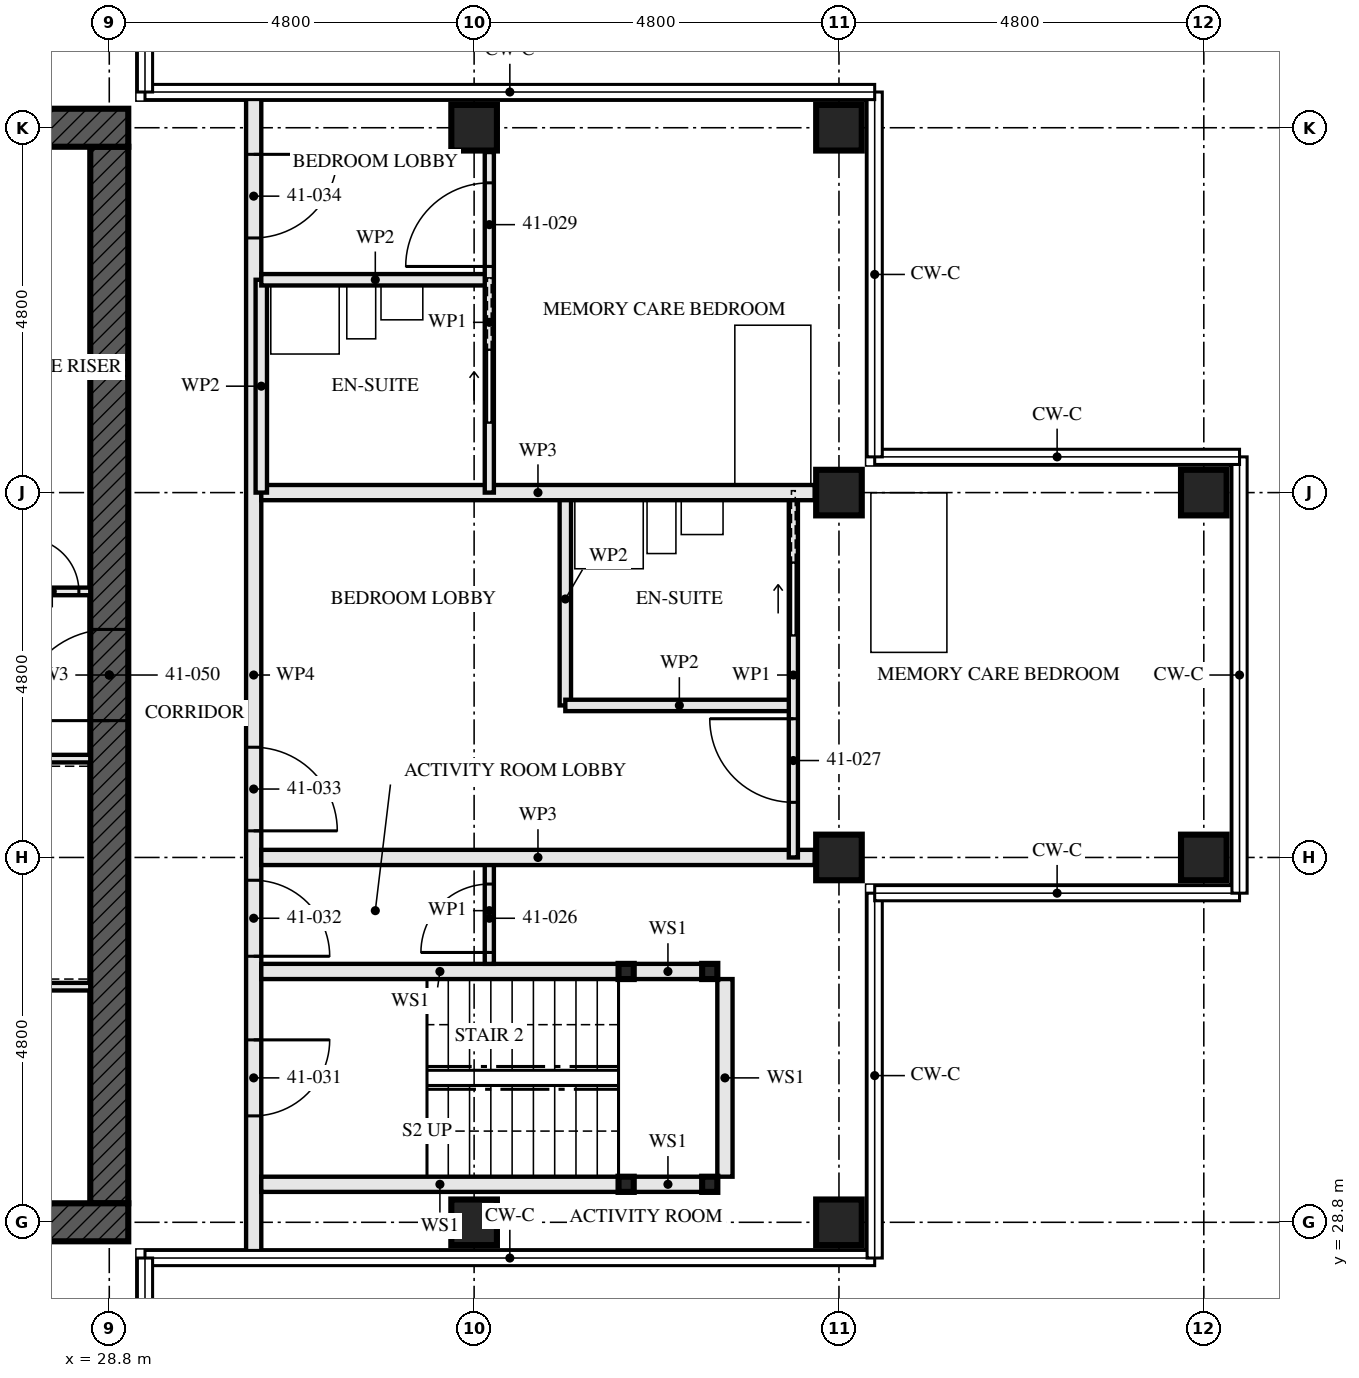
"""IFC4 building model, lengths in metres.
Left out: names, types, materials, properties, quantities, classifications, styles, units other than length and angle.
Written with IfcOpenShell. Run it as: python <this file> out.ifc"""

import sys

from ifc_helpers import new_model, si_unit, direction, frame, frame_2d, origin, origin_2d, place, context, subcontext, project, spatial, rectangle, hollow_rectangle, extrude, element, fill, save


model = new_model("IFC4")
c1 = context("Model", 3, precision=1e-05, world=origin(), true_north=direction((0.0, 1.0)))
c2 = subcontext(c1, "Body", "Model", "MODEL_VIEW")
j1 = project(units=[si_unit("LENGTHUNIT", "METRE"), si_unit("PLANEANGLEUNIT", "RADIAN")], contexts=[c1])
p1 = place(None, origin())
s1 = spatial("IfcSite", under=j1, at=p1, CompositionType="ELEMENT")
p2 = place(p1, origin())
s2 = spatial("IfcBuilding", under=s1, at=p2, CompositionType="ELEMENT")
p3 = place(p2, frame((0.0, 0.0, 151.5)))
s3 = spatial("IfcBuildingStorey", under=s2, at=p3, CompositionType="ELEMENT", Elevation=151.5)
for number, where, z_axis, x_axis in (
    (1, (33.6, 28.8, 0.0), (0.0, 0.0, 1.0), (0.0, 1.0, 0.0)),
    (2, (33.6, 43.2, 0.0), (0.0, 0.0, 1.0), (0.0, 1.0, 0.0)),
):
    element("IfcColumn", number, at=place(p3, frame(where, z_axis=z_axis, x_axis=x_axis)), inside=s3, PredefinedType="COLUMN", context=c2, shape_type="SweptSolid", body=[
        extrude(hollow_rectangle(XDim=0.6, YDim=0.6, WallThickness=0.08, at=origin_2d()), origin(), (0.0, 0.0, 1.0), 3.5),
    ])
for number, where, z_axis, x_axis in (
    (3, (38.4, 28.8, 0.0), (0.0, 0.0, 1.0), (0.0, 1.0, 0.0)),
    (4, (38.4, 33.6, 0.0), (0.0, 0.0, 1.0), (0.0, 1.0, 0.0)),
    (5, (38.4, 38.4, 0.0), (0.0, 0.0, 1.0), (0.0, 1.0, 0.0)),
    (6, (38.4, 43.2, 0.0), (0.0, 0.0, 1.0), (0.0, 1.0, 0.0)),
    (7, (43.2, 33.6, 0.0), (0.0, 0.0, 1.0), (0.0, 1.0, 0.0)),
    (8, (43.2, 38.4, 0.0), (0.0, 0.0, 1.0), (0.0, 1.0, 0.0)),
):
    element("IfcColumn", number, at=place(p3, frame(where, z_axis=z_axis, x_axis=x_axis)), inside=s3, PredefinedType="COLUMN", context=c2, shape_type="SweptSolid", body=[
        extrude(hollow_rectangle(XDim=0.6, YDim=0.6, WallThickness=0.06, at=origin_2d()), origin(), (0.0, 0.0, 1.0), 3.5),
    ])
p4 = place(p3, frame((14.15, 28.8, -0.17), z_axis=(0.0, 0.0, 1.0), x_axis=(1.0, 0.0, 0.0)))
e9 = element("IfcWall", 9, at=p4, inside=s3, PredefinedType="SHEAR", context=c2, shape_type="SweptSolid", body=[
    extrude(rectangle(XDim=14.9, YDim=0.5, at=frame_2d((7.45, 0.0))), origin(), (0.0, 0.0, 1.0), 3.5),
])
p5 = place(p4, frame((6.85, 0.0, 0.17)))
e10 = element("IfcOpeningElement", 10, at=p5, cuts=e9, PredefinedType="OPENING", context=c2, shape_type="SweptSolid", body=[
    extrude(rectangle(XDim=1.2, YDim=2.1, at=frame_2d((0.6, 1.05))), frame((0.0, 0.26, 0.0), z_axis=(0.0, -1.0, 0.0), x_axis=(1.0, 0.0, 0.0)), (0.0, 0.0, 1.0), 0.521),
])
p6 = place(p3, frame((29.05, 43.2, -0.17), z_axis=(0.0, 0.0, 1.0), x_axis=(-1.0, 0.0, 0.0)))
e11 = element("IfcWall", 11, at=p6, inside=s3, PredefinedType="SHEAR", context=c2, shape_type="SweptSolid", body=[
    extrude(rectangle(XDim=14.9, YDim=0.5, at=frame_2d((7.45, 0.0))), origin(), (0.0, 0.0, 1.0), 3.5),
])
p7 = place(p6, frame((6.85, 0.0, 0.17)))
e12 = element("IfcOpeningElement", 12, at=p7, cuts=e11, PredefinedType="OPENING", context=c2, shape_type="SweptSolid", body=[
    extrude(rectangle(XDim=1.2, YDim=2.1, at=frame_2d((0.6, 1.05))), frame((0.0, 0.26, 0.0), z_axis=(0.0, -1.0, 0.0), x_axis=(1.0, 0.0, 0.0)), (0.0, 0.0, 1.0), 0.521),
])
p8 = place(p3, frame((28.8, 29.05, -0.17), z_axis=(0.0, 0.0, 1.0), x_axis=(0.0, 1.0, 0.0)))
e13 = element("IfcWall", 13, at=p8, inside=s3, PredefinedType="SHEAR", context=c2, shape_type="SweptSolid", body=[
    extrude(rectangle(XDim=13.9, YDim=0.5, at=frame_2d((6.95, 0.0))), origin(), (0.0, 0.0, 1.0), 3.5),
])
p9 = place(p8, frame((6.35, 0.0, 0.17)))
e14 = element("IfcOpeningElement", 14, at=p9, cuts=e13, PredefinedType="OPENING", context=c2, shape_type="SweptSolid", body=[
    extrude(rectangle(XDim=1.2, YDim=2.1, at=frame_2d((0.6, 1.05))), frame((0.0, 0.26, 0.0), z_axis=(0.0, -1.0, 0.0), x_axis=(1.0, 0.0, 0.0)), (0.0, 0.0, 1.0), 0.521),
])
for number, where, z_axis, x_axis in (
    (15, (36.7, 29.3, 0.0), (0.0, 0.0, 1.0), (1.0, 0.0, 0.0)),
    (16, (36.7, 32.1, 0.0), (0.0, 0.0, 1.0), (1.0, 0.0, 0.0)),
    (17, (35.6, 29.3, 0.0), (0.0, 0.0, 1.0), (1.0, 0.0, 0.0)),
    (18, (35.6, 32.1, 0.0), (0.0, 0.0, 1.0), (1.0, 0.0, 0.0)),
):
    element("IfcColumn", number, at=place(p3, frame(where, z_axis=z_axis, x_axis=x_axis)), inside=s3, PredefinedType="COLUMN", context=c2, shape_type="SweptSolid", body=[
        extrude(hollow_rectangle(XDim=0.2, YDim=0.2, WallThickness=0.008, at=origin_2d()), origin(), (0.0, 0.0, 1.0), 3.33),
    ])
p10 = place(p3, frame((36.6, 29.3, 0.0), z_axis=(0.0, 0.0, 1.0), x_axis=(-1.0, 0.0, 0.0)))
e19 = element("IfcWall", 19, at=p10, inside=s3, PredefinedType="SOLIDWALL", context=c2, shape_type="SweptSolid", body=[
    extrude(rectangle(XDim=0.9, YDim=0.2, at=frame_2d((0.45, 0.0))), origin(), (0.0, 0.0, 1.0), 2.99),
])
p11 = place(p3, frame((35.5, 29.3, 0.0), z_axis=(0.0, 0.0, 1.0), x_axis=(-1.0, 0.0, 0.0)))
e20 = element("IfcWall", 20, at=p11, inside=s3, PredefinedType="SOLIDWALL", context=c2, shape_type="SweptSolid", body=[
    extrude(rectangle(XDim=4.7, YDim=0.2, at=frame_2d((2.35, 0.0))), origin(), (0.0, 0.0, 1.0), 2.99),
])
p12 = place(p3, frame((36.6, 32.1, 0.0), z_axis=(0.0, 0.0, 1.0), x_axis=(-1.0, 0.0, 0.0)))
e21 = element("IfcWall", 21, at=p12, inside=s3, PredefinedType="SOLIDWALL", context=c2, shape_type="SweptSolid", body=[
    extrude(rectangle(XDim=0.9, YDim=0.2, at=frame_2d((0.45, 0.0))), origin(), (0.0, 0.0, 1.0), 2.99),
])
p13 = place(p3, frame((35.5, 32.1, 0.0), z_axis=(0.0, 0.0, 1.0), x_axis=(-1.0, 0.0, 0.0)))
e22 = element("IfcWall", 22, at=p13, inside=s3, PredefinedType="SOLIDWALL", context=c2, shape_type="SweptSolid", body=[
    extrude(rectangle(XDim=4.7, YDim=0.2, at=frame_2d((2.35, 0.0))), origin(), (0.0, 0.0, 1.0), 2.99),
])
p14 = place(p3, frame((36.9, 29.4, 0.0), z_axis=(0.0, 0.0, 1.0), x_axis=(0.0, 1.0, 0.0)))
e23 = element("IfcWall", 23, at=p14, inside=s3, PredefinedType="SOLIDWALL", context=c2, shape_type="SweptSolid", body=[
    extrude(rectangle(XDim=2.6, YDim=0.2, at=frame_2d((1.3, 0.0))), origin(), (0.0, 0.0, 1.0), 3.33),
])
p15 = place(p3, frame((33.8, 32.2, 0.0), z_axis=(0.0, 0.0, 1.0), x_axis=(0.0, 1.0, 0.0)))
e24 = element("IfcWall", 24, at=p15, inside=s3, PredefinedType="PARTITIONING", context=c2, shape_type="SweptSolid", body=[
    extrude(rectangle(XDim=1.4, YDim=0.12, at=frame_2d((0.7, 0.0))), origin(), (0.0, 0.0, 1.0), 3.33),
])
p16 = place(p15, frame((0.15, 0.0, 0.0)))
e25 = element("IfcOpeningElement", 25, at=p16, cuts=e24, PredefinedType="OPENING", context=c2, shape_type="SweptSolid", body=[
    extrude(rectangle(XDim=0.9, YDim=2.1, at=frame_2d((0.45, 1.05))), frame((0.0, 0.071, 0.0), z_axis=(0.0, -1.0, 0.0), x_axis=(1.0, 0.0, 0.0)), (0.0, 0.0, 1.0), 0.141),
])
p17 = place(p3, frame((38.08, 33.6, 0.0), z_axis=(0.0, 0.0, 1.0), x_axis=(-1.0, 0.0, 0.0)))
e26 = element("IfcWall", 26, at=p17, inside=s3, PredefinedType="PARTITIONING", context=c2, shape_type="SweptSolid", body=[
    extrude(rectangle(XDim=7.28, YDim=0.2, at=frame_2d((3.64, 0.0))), origin(), (0.0, 0.0, 1.0), 2.55),
])
p18 = place(p3, frame((37.8, 35.6, 0.0), z_axis=(0.0, 0.0, 1.0), x_axis=(-1.0, 0.0, 0.0)))
e27 = element("IfcWall", 27, at=p18, inside=s3, PredefinedType="PARTITIONING", context=c2, shape_type="SweptSolid", body=[
    extrude(rectangle(XDim=3.0, YDim=0.15, at=frame_2d((1.5, 0.0))), origin(), (0.0, 0.0, 1.0), 3.33),
])
p19 = place(p3, frame((34.8, 35.6, 0.0), z_axis=(0.0, 0.0, 1.0), x_axis=(0.0, 1.0, 0.0)))
e28 = element("IfcWall", 28, at=p19, inside=s3, PredefinedType="PARTITIONING", context=c2, shape_type="SweptSolid", body=[
    extrude(rectangle(XDim=2.8, YDim=0.15, at=frame_2d((1.4, 0.0))), origin(), (0.0, 0.0, 1.0), 3.33),
])
p20 = place(p3, frame((37.8, 33.6, 0.0), z_axis=(0.0, 0.0, 1.0), x_axis=(0.0, 1.0, 0.0)))
e29 = element("IfcWall", 29, at=p20, inside=s3, PredefinedType="PARTITIONING", context=c2, shape_type="SweptSolid", body=[
    extrude(rectangle(XDim=4.8, YDim=0.12, at=frame_2d((2.4, 0.0))), origin(), (0.0, 0.0, 1.0), 3.33),
])
p21 = place(p20, frame((0.725, 0.0, 0.0)))
e30 = element("IfcOpeningElement", 30, at=p21, cuts=e29, PredefinedType="OPENING", context=c2, shape_type="SweptSolid", body=[
    extrude(rectangle(XDim=1.1, YDim=2.1, at=frame_2d((0.55, 1.05))), frame((0.0, 0.071, 0.0), z_axis=(0.0, -1.0, 0.0), x_axis=(1.0, 0.0, 0.0)), (0.0, 0.0, 1.0), 0.141),
])
p22 = place(p20, frame((2.925, 0.0, 0.0)))
e31 = element("IfcOpeningElement", 31, at=p22, cuts=e29, PredefinedType="OPENING", context=c2, shape_type="SweptSolid", body=[
    extrude(rectangle(XDim=0.95, YDim=2.1, at=frame_2d((0.475, 1.05))), frame((0.0, 0.071, 0.0), z_axis=(0.0, -1.0, 0.0), x_axis=(1.0, 0.0, 0.0)), (0.0, 0.0, 1.0), 0.141),
])
p23 = place(p3, frame((38.08, 38.4, 0.0), z_axis=(0.0, 0.0, 1.0), x_axis=(-1.0, 0.0, 0.0)))
e32 = element("IfcWall", 32, at=p23, inside=s3, PredefinedType="PARTITIONING", context=c2, shape_type="SweptSolid", body=[
    extrude(rectangle(XDim=7.28, YDim=0.2, at=frame_2d((3.64, 0.0))), origin(), (0.0, 0.0, 1.0), 2.55),
])
p24 = place(p3, frame((33.8, 41.2, 0.0), z_axis=(0.0, 0.0, 1.0), x_axis=(-1.0, 0.0, 0.0)))
e33 = element("IfcWall", 33, at=p24, inside=s3, PredefinedType="PARTITIONING", context=c2, shape_type="SweptSolid", body=[
    extrude(rectangle(XDim=3.0, YDim=0.15, at=frame_2d((1.5, 0.0))), origin(), (0.0, 0.0, 1.0), 3.33),
])
p25 = place(p3, frame((30.8, 38.4, 0.0), z_axis=(0.0, 0.0, 1.0), x_axis=(0.0, 1.0, 0.0)))
e34 = element("IfcWall", 34, at=p25, inside=s3, PredefinedType="PARTITIONING", context=c2, shape_type="SweptSolid", body=[
    extrude(rectangle(XDim=2.8, YDim=0.15, at=frame_2d((1.4, 0.0))), origin(), (0.0, 0.0, 1.0), 3.33),
])
p26 = place(p3, frame((33.8, 38.4, 0.0), z_axis=(0.0, 0.0, 1.0), x_axis=(0.0, 1.0, 0.0)))
e35 = element("IfcWall", 35, at=p26, inside=s3, PredefinedType="PARTITIONING", context=c2, shape_type="SweptSolid", body=[
    extrude(rectangle(XDim=4.48, YDim=0.12, at=frame_2d((2.24, 0.0))), origin(), (0.0, 0.0, 1.0), 3.33),
])
p27 = place(p26, frame((2.975, 0.0, 0.0)))
e36 = element("IfcOpeningElement", 36, at=p27, cuts=e35, PredefinedType="OPENING", context=c2, shape_type="SweptSolid", body=[
    extrude(rectangle(XDim=1.1, YDim=2.1, at=frame_2d((0.55, 1.05))), frame((0.0, 0.071, 0.0), z_axis=(0.0, -1.0, 0.0), x_axis=(1.0, 0.0, 0.0)), (0.0, 0.0, 1.0), 0.141),
])
p28 = place(p26, frame((0.925, 0.0, 0.0)))
e37 = element("IfcOpeningElement", 37, at=p28, cuts=e35, PredefinedType="OPENING", context=c2, shape_type="SweptSolid", body=[
    extrude(rectangle(XDim=0.95, YDim=2.1, at=frame_2d((0.475, 1.05))), frame((0.0, 0.071, 0.0), z_axis=(0.0, -1.0, 0.0), x_axis=(1.0, 0.0, 0.0)), (0.0, 0.0, 1.0), 0.141),
])
p29 = place(p3, frame((30.7, 28.35, 0.0), z_axis=(0.0, 0.0, 1.0), x_axis=(0.0, 1.0, 0.0)))
e38 = element("IfcWall", 38, at=p29, inside=s3, PredefinedType="PARTITIONING", context=c2, shape_type="SweptSolid", body=[
    extrude(rectangle(XDim=15.3, YDim=0.2, at=frame_2d((7.65, 0.0))), origin(), (0.0, 0.0, 1.0), 2.32),
])
p30 = place(p29, frame((1.85, 0.0, 0.0)))
e39 = element("IfcOpeningElement", 39, at=p30, cuts=e38, PredefinedType="OPENING", context=c2, shape_type="SweptSolid", body=[
    extrude(rectangle(XDim=1.0, YDim=2.1, at=frame_2d((0.5, 1.05))), frame((0.0, 0.111, 0.0), z_axis=(0.0, -1.0, 0.0), x_axis=(1.0, 0.0, 0.0)), (0.0, 0.0, 1.0), 0.221),
])
p31 = place(p29, frame((3.95, 0.0, 0.0)))
e40 = element("IfcOpeningElement", 40, at=p31, cuts=e38, PredefinedType="OPENING", context=c2, shape_type="SweptSolid", body=[
    extrude(rectangle(XDim=1.0, YDim=2.1, at=frame_2d((0.5, 1.05))), frame((0.0, 0.111, 0.0), z_axis=(0.0, -1.0, 0.0), x_axis=(1.0, 0.0, 0.0)), (0.0, 0.0, 1.0), 0.221),
])
p32 = place(p29, frame((5.6, 0.0, 0.0)))
e41 = element("IfcOpeningElement", 41, at=p32, cuts=e38, PredefinedType="OPENING", context=c2, shape_type="SweptSolid", body=[
    extrude(rectangle(XDim=1.1, YDim=2.1, at=frame_2d((0.55, 1.05))), frame((0.0, 0.111, 0.0), z_axis=(0.0, -1.0, 0.0), x_axis=(1.0, 0.0, 0.0)), (0.0, 0.0, 1.0), 0.221),
])
p33 = place(p29, frame((13.4, 0.0, 0.0)))
e42 = element("IfcOpeningElement", 42, at=p33, cuts=e38, PredefinedType="OPENING", context=c2, shape_type="SweptSolid", body=[
    extrude(rectangle(XDim=1.1, YDim=2.1, at=frame_2d((0.55, 1.05))), frame((0.0, 0.111, 0.0), z_axis=(0.0, -1.0, 0.0), x_axis=(1.0, 0.0, 0.0)), (0.0, 0.0, 1.0), 0.221),
])
p34 = place(p3, frame((23.05, 34.9, 0.0), z_axis=(0.0, 0.0, 1.0), x_axis=(1.0, 0.0, 0.0)))
e43 = element("IfcWall", 43, at=p34, inside=s3, PredefinedType="SOLIDWALL", context=c2, shape_type="SweptSolid", body=[
    extrude(rectangle(XDim=5.5, YDim=0.1, at=frame_2d((2.75, 0.0))), origin(), (0.0, 0.0, 1.0), 3.33),
])
p35 = place(p34, frame((0.85, 0.0, 0.0)))
e44 = element("IfcOpeningElement", 44, at=p35, cuts=e43, PredefinedType="OPENING", context=c2, shape_type="SweptSolid", body=[
    extrude(rectangle(XDim=1.0, YDim=2.1, at=frame_2d((0.5, 1.05))), frame((0.0, 0.061, 0.0), z_axis=(0.0, -1.0, 0.0), x_axis=(1.0, 0.0, 0.0)), (0.0, 0.0, 1.0), 0.121),
])
p36 = place(p34, frame((3.625, 0.0, 0.0)))
e45 = element("IfcOpeningElement", 45, at=p36, cuts=e43, PredefinedType="OPENING", context=c2, shape_type="SweptSolid", body=[
    extrude(rectangle(XDim=1.0, YDim=2.1, at=frame_2d((0.5, 1.05))), frame((0.0, 0.061, 0.0), z_axis=(0.0, -1.0, 0.0), x_axis=(1.0, 0.0, 0.0)), (0.0, 0.0, 1.0), 0.121),
])
p37 = place(p3, frame((22.65, 37.1, 0.0), z_axis=(0.0, 0.0, 1.0), x_axis=(1.0, 0.0, 0.0)))
e46 = element("IfcWall", 46, at=p37, inside=s3, PredefinedType="SOLIDWALL", context=c2, shape_type="SweptSolid", body=[
    extrude(rectangle(XDim=5.9, YDim=0.1, at=frame_2d((2.95, 0.0))), origin(), (0.0, 0.0, 1.0), 3.33),
])
p38 = place(p37, frame((3.5, 0.0, 0.0)))
e47 = element("IfcOpeningElement", 47, at=p38, cuts=e46, PredefinedType="OPENING", context=c2, shape_type="SweptSolid", body=[
    extrude(rectangle(XDim=0.9, YDim=2.1, at=frame_2d((0.45, 1.05))), frame((0.0, 0.061, 0.0), z_axis=(0.0, -1.0, 0.0), x_axis=(1.0, 0.0, 0.0)), (0.0, 0.0, 1.0), 0.121),
])
p39 = place(p37, frame((5.05, 0.0, 0.0)))
e48 = element("IfcOpeningElement", 48, at=p39, cuts=e46, PredefinedType="OPENING", context=c2, shape_type="SweptSolid", body=[
    extrude(rectangle(XDim=0.7, YDim=2.1, at=frame_2d((0.35, 1.05))), frame((0.0, 0.061, 0.0), z_axis=(0.0, -1.0, 0.0), x_axis=(1.0, 0.0, 0.0)), (0.0, 0.0, 1.0), 0.121),
])
p40 = place(p3, frame((23.15, 31.9, 0.0), z_axis=(0.0, 0.0, 1.0), x_axis=(1.0, 0.0, 0.0)))
e49 = element("IfcWall", 49, at=p40, inside=s3, PredefinedType="SOLIDWALL", context=c2, shape_type="SweptSolid", body=[
    extrude(rectangle(XDim=5.4, YDim=0.1, at=frame_2d((2.7, 0.0))), origin(), (0.0, 0.0, 1.0), 3.33),
])
p41 = place(p16, origin())
e50 = element("IfcDoor", 50, at=p41, inside=s3, OperationType="SINGLE_SWING_RIGHT", PredefinedType="DOOR", context=c2, shape_type="SweptSolid", body=[
    extrude(rectangle(XDim=0.9, YDim=2.1, at=frame_2d((0.45, 1.05))), frame((0.0, 0.022, 0.0), z_axis=(0.0, -1.0, 0.0), x_axis=(1.0, 0.0, 0.0)), (0.0, 0.0, 1.0), 0.044),
])
fill(e25, e50)
p42 = place(p21, origin())
e51 = element("IfcDoor", 51, at=p42, inside=s3, OperationType="SINGLE_SWING_LEFT", PredefinedType="DOOR", context=c2, shape_type="SweptSolid", body=[
    extrude(rectangle(XDim=1.1, YDim=2.1, at=frame_2d((0.55, 1.05))), frame((0.0, 0.022, 0.0), z_axis=(0.0, -1.0, 0.0), x_axis=(1.0, 0.0, 0.0)), (0.0, 0.0, 1.0), 0.044),
])
fill(e30, e51)
p43 = place(p22, origin())
e52 = element("IfcDoor", 52, at=p43, inside=s3, OperationType="SLIDING_TO_LEFT", PredefinedType="DOOR", context=c2, shape_type="SweptSolid", body=[
    extrude(rectangle(XDim=0.95, YDim=2.1, at=frame_2d((0.475, 1.05))), frame((0.0, 0.022, 0.0), z_axis=(0.0, -1.0, 0.0), x_axis=(1.0, 0.0, 0.0)), (0.0, 0.0, 1.0), 0.044),
])
fill(e31, e52)
p44 = place(p27, origin())
e53 = element("IfcDoor", 53, at=p44, inside=s3, OperationType="SINGLE_SWING_RIGHT", PredefinedType="DOOR", context=c2, shape_type="SweptSolid", body=[
    extrude(rectangle(XDim=1.1, YDim=2.1, at=frame_2d((0.55, 1.05))), frame((0.0, 0.022, 0.0), z_axis=(0.0, -1.0, 0.0), x_axis=(1.0, 0.0, 0.0)), (0.0, 0.0, 1.0), 0.044),
])
fill(e36, e53)
p45 = place(p28, origin())
e54 = element("IfcDoor", 54, at=p45, inside=s3, OperationType="SLIDING_TO_LEFT", PredefinedType="DOOR", context=c2, shape_type="SweptSolid", body=[
    extrude(rectangle(XDim=0.95, YDim=2.1, at=frame_2d((0.475, 1.05))), frame((0.0, 0.022, 0.0), z_axis=(0.0, -1.0, 0.0), x_axis=(1.0, 0.0, 0.0)), (0.0, 0.0, 1.0), 0.044),
])
fill(e37, e54)
p46 = place(p30, frame((1.0, 0.0, 0.0), z_axis=(0.0, 0.0, 1.0), x_axis=(-1.0, 0.0, 0.0)))
e55 = element("IfcDoor", 55, at=p46, inside=s3, OperationType="SINGLE_SWING_RIGHT", PredefinedType="DOOR", context=c2, shape_type="SweptSolid", body=[
    extrude(rectangle(XDim=1.0, YDim=2.1, at=frame_2d((0.5, 1.05))), frame((0.0, 0.032, 0.0), z_axis=(0.0, -1.0, 0.0), x_axis=(1.0, 0.0, 0.0)), (0.0, 0.0, 1.0), 0.064),
])
fill(e39, e55)
p47 = place(p31, frame((1.0, 0.0, 0.0), z_axis=(0.0, 0.0, 1.0), x_axis=(-1.0, 0.0, 0.0)))
e56 = element("IfcDoor", 56, at=p47, inside=s3, OperationType="SINGLE_SWING_LEFT", PredefinedType="DOOR", context=c2, shape_type="SweptSolid", body=[
    extrude(rectangle(XDim=1.0, YDim=2.1, at=frame_2d((0.5, 1.05))), frame((0.0, 0.027, 0.0), z_axis=(0.0, -1.0, 0.0), x_axis=(1.0, 0.0, 0.0)), (0.0, 0.0, 1.0), 0.054),
])
fill(e40, e56)
p48 = place(p32, frame((1.1, 0.0, 0.0), z_axis=(0.0, 0.0, 1.0), x_axis=(-1.0, 0.0, 0.0)))
e57 = element("IfcDoor", 57, at=p48, inside=s3, OperationType="SINGLE_SWING_LEFT", PredefinedType="DOOR", context=c2, shape_type="SweptSolid", body=[
    extrude(rectangle(XDim=1.1, YDim=2.1, at=frame_2d((0.55, 1.05))), frame((0.0, 0.027, 0.0), z_axis=(0.0, -1.0, 0.0), x_axis=(1.0, 0.0, 0.0)), (0.0, 0.0, 1.0), 0.054),
])
fill(e41, e57)
p49 = place(p33, frame((1.1, 0.0, 0.0), z_axis=(0.0, 0.0, 1.0), x_axis=(-1.0, 0.0, 0.0)))
e58 = element("IfcDoor", 58, at=p49, inside=s3, OperationType="SINGLE_SWING_RIGHT", PredefinedType="DOOR", context=c2, shape_type="SweptSolid", body=[
    extrude(rectangle(XDim=1.1, YDim=2.1, at=frame_2d((0.55, 1.05))), frame((0.0, 0.027, 0.0), z_axis=(0.0, -1.0, 0.0), x_axis=(1.0, 0.0, 0.0)), (0.0, 0.0, 1.0), 0.054),
])
fill(e42, e58)
p50 = place(p39, origin())
e59 = element("IfcDoor", 59, at=p50, inside=s3, OperationType="SINGLE_SWING_RIGHT", PredefinedType="DOOR", context=c2, shape_type="SweptSolid", body=[
    extrude(rectangle(XDim=0.7, YDim=2.1, at=frame_2d((0.35, 1.05))), frame((0.0, 0.027, 0.0), z_axis=(0.0, -1.0, 0.0), x_axis=(1.0, 0.0, 0.0)), (0.0, 0.0, 1.0), 0.054),
])
fill(e48, e59)
p51 = place(p9, origin())
e60 = element("IfcDoor", 60, at=p51, inside=s3, OperationType="SINGLE_SWING_LEFT", PredefinedType="DOOR", context=c2, shape_type="SweptSolid", body=[
    extrude(rectangle(XDim=1.2, YDim=2.1, at=frame_2d((0.6, 1.05))), frame((0.0, 0.027, 0.0), z_axis=(0.0, -1.0, 0.0), x_axis=(1.0, 0.0, 0.0)), (0.0, 0.0, 1.0), 0.054),
])
fill(e14, e60)
save(model, sys.argv[1])
